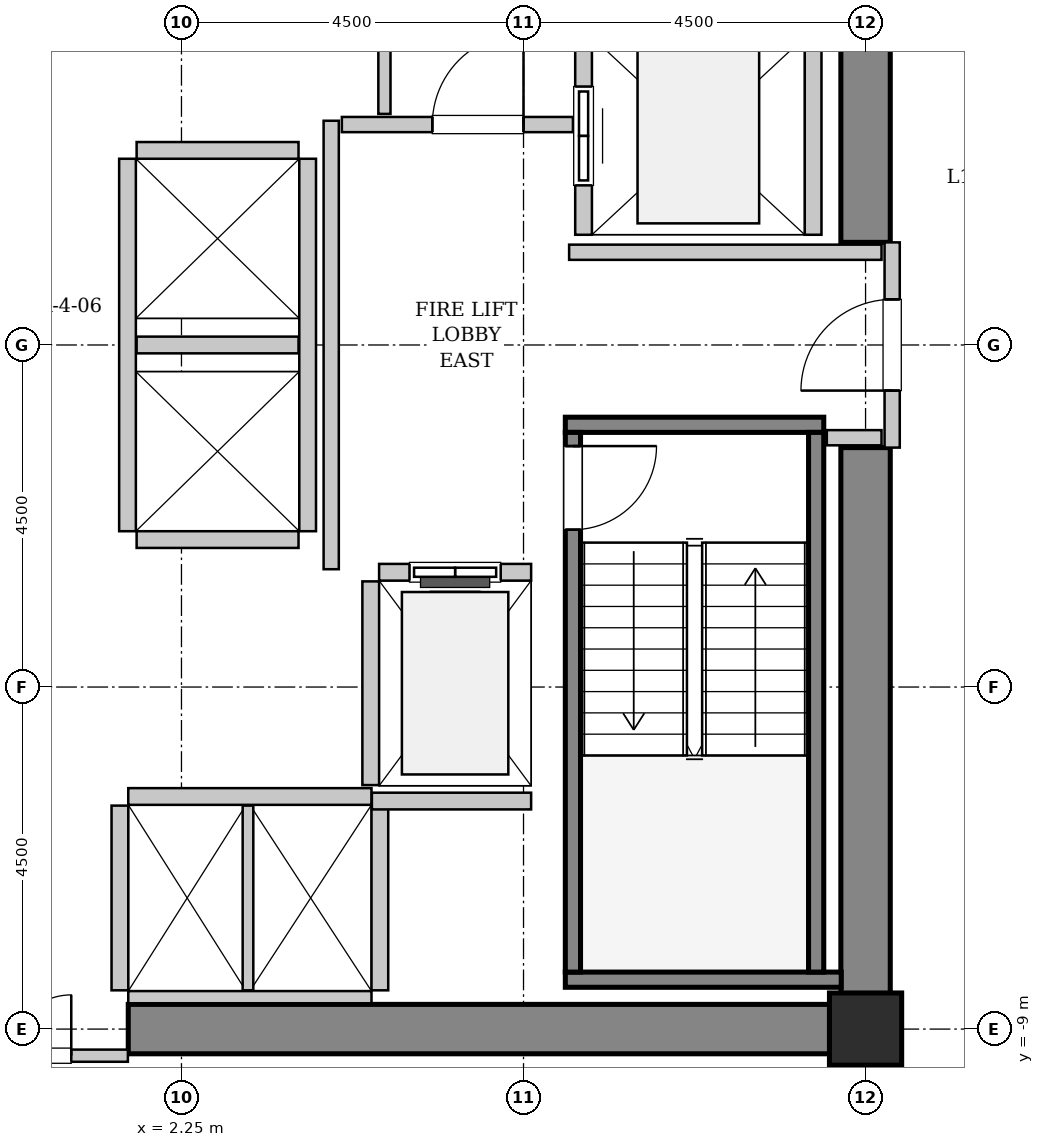
"""IFC4 building model, lengths in metres.
Left out: names, types, materials, properties, quantities, classifications, styles, units other than length and angle.
Written with IfcOpenShell. Run it as: python <this file> out.ifc"""

import sys

from ifc_helpers import new_model, si_unit, direction, frame, frame_2d, origin, origin_2d, place, context, subcontext, project, spatial, rectangle, hollow_rectangle, extrude, source, transform, mapped, element, fill, save


model = new_model("IFC4")
c1 = context("Model", 3, precision=1e-05, world=origin(), true_north=direction((0.0, 1.0)))
c2 = subcontext(c1, "Body", "Model", "MODEL_VIEW")
j1 = project(units=[si_unit("LENGTHUNIT", "METRE"), si_unit("PLANEANGLEUNIT", "RADIAN")], contexts=[c1])
p1 = place(None, origin())
s1 = spatial("IfcSite", under=j1, at=p1, CompositionType="ELEMENT")
p2 = place(p1, origin())
s2 = spatial("IfcBuilding", under=s1, at=p2, CompositionType="ELEMENT")
p3 = place(p2, frame((0.0, 0.0, 78.6)))
s3 = spatial("IfcBuildingStorey", under=s2, at=p3, CompositionType="ELEMENT", Elevation=78.6)
m1 = source(origin(), c2, "Body", "SweptSolid", [
    extrude(rectangle(XDim=10.025, YDim=0.65, at=frame_2d((5.012, 0.0))), origin(), (0.0, 0.0, 1.0), 3.8),
])
p4 = place(p3, frame((1.55, -9.0, 0.0), z_axis=(0.0, 0.0, 1.0), x_axis=(1.0, 0.0, 0.0)))
e1 = element("IfcWall", 1, at=p4, inside=s3, PredefinedType="SHEAR", context=c2, shape_type="MappedRepresentation", body=[
    mapped(m1, transform((0.0, 0.0, 0.0), x_axis=(1.0, 0.0, 0.0), y_axis=(0.0, 1.0, 0.0), z_axis=(0.0, 0.0, 1.0), scale=1.0)),
])
m2 = source(origin(), c2, "Body", "SweptSolid", [
    extrude(rectangle(XDim=7.325, YDim=0.65, at=frame_2d((3.663, 0.0))), origin(), (0.0, 0.0, 1.0), 3.8),
])
for number, where, z_axis, x_axis in (
    (2, (11.25, -8.675, 0.0), (0.0, 0.0, 1.0), (0.0, 1.0, 0.0)),
    (3, (11.25, 1.35, 0.0), (0.0, 0.0, 1.0), (0.0, 1.0, 0.0)),
):
    element("IfcWall", number, at=place(p3, frame(where, z_axis=z_axis, x_axis=x_axis)), inside=s3, PredefinedType="SHEAR", context=c2, shape_type="MappedRepresentation", body=[
        mapped(m2, transform((0.0, 0.0, 0.0), x_axis=(1.0, 0.0, 0.0), y_axis=(0.0, 1.0, 0.0), z_axis=(0.0, 0.0, 1.0), scale=1.0)),
    ])
m3 = source(origin(), c2, "Body", "SweptSolid", [
    extrude(hollow_rectangle(XDim=0.95, YDim=0.95, WallThickness=0.045, InnerFilletRadius=0.045, OuterFilletRadius=0.09, at=origin_2d()), origin(), (0.0, 0.0, 1.0), 3.8),
])
p5 = place(p3, frame((11.25, -9.0, 0.0), z_axis=(0.0, 0.0, 1.0), x_axis=(1.0, 0.0, 0.0)))
e4 = element("IfcColumn", 4, at=p5, inside=s3, PredefinedType="COLUMN", context=c2, shape_type="MappedRepresentation", body=[
    mapped(m3, transform((0.0, 0.0, 0.0), x_axis=(1.0, 0.0, 0.0), y_axis=(0.0, 1.0, 0.0), z_axis=(0.0, 0.0, 1.0), scale=1.0)),
])
m4 = source(origin(), c2, "Body", "SweptSolid", [
    extrude(rectangle(XDim=3.4, YDim=0.2, at=frame_2d((1.7, 0.0))), origin(), (0.0, 0.0, 1.0), 3.8),
])
p6 = place(p3, frame((7.3, -1.05, 0.0), z_axis=(0.0, 0.0, 1.0), x_axis=(1.0, 0.0, 0.0)))
e5 = element("IfcWall", 5, at=p6, inside=s3, PredefinedType="SOLIDWALL", context=c2, shape_type="MappedRepresentation", body=[
    mapped(m4, transform((0.0, 0.0, 0.0), x_axis=(1.0, 0.0, 0.0), y_axis=(0.0, 1.0, 0.0), z_axis=(0.0, 0.0, 1.0), scale=1.0)),
])
m5 = source(origin(), c2, "Body", "SweptSolid", [
    extrude(rectangle(XDim=3.63, YDim=0.2, at=frame_2d((1.815, 0.0))), origin(), (0.0, 0.0, 1.0), 3.8),
])
p7 = place(p3, frame((7.3, -8.35, 0.0), z_axis=(0.0, 0.0, 1.0), x_axis=(1.0, 0.0, 0.0)))
e6 = element("IfcWall", 6, at=p7, inside=s3, PredefinedType="SOLIDWALL", context=c2, shape_type="MappedRepresentation", body=[
    mapped(m5, transform((0.0, 0.0, 0.0), x_axis=(1.0, 0.0, 0.0), y_axis=(0.0, 1.0, 0.0), z_axis=(0.0, 0.0, 1.0), scale=1.0)),
])
m6 = source(origin(), c2, "Body", "SweptSolid", [
    extrude(rectangle(XDim=7.1, YDim=0.2, at=frame_2d((3.55, 0.0))), origin(), (0.0, 0.0, 1.0), 3.8),
])
p8 = place(p3, frame((7.4, -1.15, 0.0), z_axis=(0.0, 0.0, 1.0), x_axis=(0.0, -1.0, 0.0)))
e7 = element("IfcWall", 7, at=p8, inside=s3, PredefinedType="SOLIDWALL", context=c2, shape_type="MappedRepresentation", body=[
    mapped(m6, transform((0.0, 0.0, 0.0), x_axis=(1.0, 0.0, 0.0), y_axis=(0.0, 1.0, 0.0), z_axis=(0.0, 0.0, 1.0), scale=1.0)),
])
p9 = place(p8, frame((0.18, 0.0, 0.0)))
e8 = element("IfcOpeningElement", 8, at=p9, cuts=e7, PredefinedType="OPENING", context=c2, shape_type="SweptSolid", body=[
    extrude(rectangle(XDim=1.1, YDim=2.15, at=frame_2d((0.55, 1.075))), frame((0.0, 0.11, 0.0), z_axis=(0.0, -1.0, 0.0), x_axis=(1.0, 0.0, 0.0)), (0.0, 0.0, 1.0), 0.22),
])
p10 = place(p3, frame((10.6, -1.15, 0.0), z_axis=(0.0, 0.0, 1.0), x_axis=(0.0, -1.0, 0.0)))
e9 = element("IfcWall", 9, at=p10, inside=s3, PredefinedType="SOLIDWALL", context=c2, shape_type="MappedRepresentation", body=[
    mapped(m6, transform((0.0, 0.0, 0.0), x_axis=(1.0, 0.0, 0.0), y_axis=(0.0, 1.0, 0.0), z_axis=(0.0, 0.0, 1.0), scale=1.0)),
])
m7 = source(origin(), c2, "Body", "SweptSolid", [
    extrude(rectangle(XDim=2.0, YDim=0.22, at=frame_2d((1.0, 0.0))), origin(), (0.0, 0.0, 1.0), 3.535),
])
p11 = place(p3, frame((6.85, -2.99, 0.0), z_axis=(0.0, 0.0, 1.0), x_axis=(-1.0, 0.0, 0.0)))
e10 = element("IfcWall", 10, at=p11, inside=s3, PredefinedType="SOLIDWALL", context=c2, shape_type="MappedRepresentation", body=[
    mapped(m7, transform((0.0, 0.0, 0.0), x_axis=(1.0, 0.0, 0.0), y_axis=(0.0, 1.0, 0.0), z_axis=(0.0, 0.0, 1.0), scale=1.0)),
])
p12 = place(p11, frame((0.4, 0.0, 0.0)))
e11 = element("IfcOpeningElement", 11, at=p12, cuts=e10, PredefinedType="OPENING", context=c2, shape_type="SweptSolid", body=[
    extrude(rectangle(XDim=1.2, YDim=2.2, at=frame_2d((0.6, 1.1))), frame((0.0, 0.12, 0.0), z_axis=(0.0, -1.0, 0.0), x_axis=(1.0, 0.0, 0.0)), (0.0, 0.0, 1.0), 0.24),
])
m8 = source(origin(), c2, "Body", "SweptSolid", [
    extrude(rectangle(XDim=2.68, YDim=0.22, at=frame_2d((1.34, 0.0))), origin(), (0.0, 0.0, 1.0), 3.535),
])
p13 = place(p3, frame((4.74, -3.11, 0.0), z_axis=(0.0, 0.0, 1.0), x_axis=(0.0, -1.0, 0.0)))
e12 = element("IfcWall", 12, at=p13, inside=s3, PredefinedType="SOLIDWALL", context=c2, shape_type="MappedRepresentation", body=[
    mapped(m8, transform((0.0, 0.0, 0.0), x_axis=(1.0, 0.0, 0.0), y_axis=(0.0, 1.0, 0.0), z_axis=(0.0, 0.0, 1.0), scale=1.0)),
])
m9 = source(origin(), c2, "Body", "SweptSolid", [
    extrude(rectangle(XDim=5.45, YDim=0.22, at=frame_2d((2.725, 0.0))), origin(), (0.0, 0.0, 1.0), 3.535),
])
p14 = place(p3, frame((7.54, 6.9, 0.0), z_axis=(0.0, 0.0, 1.0), x_axis=(0.0, -1.0, 0.0)))
e13 = element("IfcWall", 13, at=p14, inside=s3, PredefinedType="SOLIDWALL", context=c2, shape_type="MappedRepresentation", body=[
    mapped(m9, transform((0.0, 0.0, 0.0), x_axis=(1.0, 0.0, 0.0), y_axis=(0.0, 1.0, 0.0), z_axis=(0.0, 0.0, 1.0), scale=1.0)),
])
p15 = place(p14, frame((3.5, 0.0, 0.0)))
e14 = element("IfcOpeningElement", 14, at=p15, cuts=e13, PredefinedType="OPENING", context=c2, shape_type="SweptSolid", body=[
    extrude(rectangle(XDim=1.3, YDim=2.3, at=frame_2d((0.65, 1.15))), frame((0.0, 0.12, 0.0), z_axis=(0.0, -1.0, 0.0), x_axis=(1.0, 0.0, 0.0)), (0.0, 0.0, 1.0), 0.24),
])
p16 = place(p14, frame((0.65, 0.0, 0.0)))
e15 = element("IfcOpeningElement", 15, at=p16, cuts=e13, PredefinedType="OPENING", context=c2, shape_type="SweptSolid", body=[
    extrude(rectangle(XDim=1.3, YDim=2.3, at=frame_2d((0.65, 1.15))), frame((0.0, 0.12, 0.0), z_axis=(0.0, -1.0, 0.0), x_axis=(1.0, 0.0, 0.0)), (0.0, 0.0, 1.0), 0.24),
])
p17 = place(p3, frame((10.56, 1.45, 0.0), z_axis=(0.0, 0.0, 1.0), x_axis=(0.0, 1.0, 0.0)))
e16 = element("IfcWall", 16, at=p17, inside=s3, PredefinedType="SOLIDWALL", context=c2, shape_type="MappedRepresentation", body=[
    mapped(m9, transform((0.0, 0.0, 0.0), x_axis=(1.0, 0.0, 0.0), y_axis=(0.0, 1.0, 0.0), z_axis=(0.0, 0.0, 1.0), scale=1.0)),
])
m10 = source(origin(), c2, "Body", "SweptSolid", [
    extrude(rectangle(XDim=3.2, YDim=0.22, at=frame_2d((1.6, 0.0))), origin(), (0.0, 0.0, 1.0), 3.535),
])
p18 = place(p3, frame((4.75, -5.94, 0.0), z_axis=(0.0, 0.0, 1.0), x_axis=(-1.0, 0.0, 0.0)))
e17 = element("IfcWall", 17, at=p18, inside=s3, PredefinedType="SOLIDWALL", context=c2, shape_type="MappedRepresentation", body=[
    mapped(m10, transform((0.0, 0.0, 0.0), x_axis=(1.0, 0.0, 0.0), y_axis=(0.0, 1.0, 0.0), z_axis=(0.0, 0.0, 1.0), scale=1.0)),
])
m11 = source(origin(), c2, "Body", "SweptSolid", [
    extrude(rectangle(XDim=3.2, YDim=0.16, at=frame_2d((1.6, 0.0))), origin(), (0.0, 0.0, 1.0), 2.425),
])
p19 = place(p3, frame((1.55, -8.58, 0.0), z_axis=(0.0, 0.0, 1.0), x_axis=(1.0, 0.0, 0.0)))
e18 = element("IfcWall", 18, at=p19, inside=s3, PredefinedType="PARTITIONING", context=c2, shape_type="MappedRepresentation", body=[
    mapped(m11, transform((0.0, 0.0, 0.0), x_axis=(1.0, 0.0, 0.0), y_axis=(0.0, 1.0, 0.0), z_axis=(0.0, 0.0, 1.0), scale=1.0)),
])
m12 = source(origin(), c2, "Body", "SweptSolid", [
    extrude(rectangle(XDim=2.43, YDim=0.22, at=frame_2d((1.215, 0.0))), origin(), (0.0, 0.0, 1.0), 3.535),
])
p20 = place(p3, frame((1.44, -6.06, 0.0), z_axis=(0.0, 0.0, 1.0), x_axis=(0.0, -1.0, 0.0)))
e19 = element("IfcWall", 19, at=p20, inside=s3, PredefinedType="SOLIDWALL", context=c2, shape_type="MappedRepresentation", body=[
    mapped(m12, transform((0.0, 0.0, 0.0), x_axis=(1.0, 0.0, 0.0), y_axis=(0.0, 1.0, 0.0), z_axis=(0.0, 0.0, 1.0), scale=1.0)),
])
m13 = source(origin(), c2, "Body", "SweptSolid", [
    extrude(rectangle(XDim=2.43, YDim=0.14, at=frame_2d((1.215, 0.0))), origin(), (0.0, 0.0, 1.0), 3.535),
])
p21 = place(p3, frame((3.125, -8.49, 0.0), z_axis=(0.0, 0.0, 1.0), x_axis=(0.0, 1.0, 0.0)))
e20 = element("IfcWall", 20, at=p21, inside=s3, PredefinedType="PARTITIONING", context=c2, shape_type="MappedRepresentation", body=[
    mapped(m13, transform((0.0, 0.0, 0.0), x_axis=(1.0, 0.0, 0.0), y_axis=(0.0, 1.0, 0.0), z_axis=(0.0, 0.0, 1.0), scale=1.0)),
])
p22 = place(p3, frame((4.86, -8.49, 0.0), z_axis=(0.0, 0.0, 1.0), x_axis=(0.0, 1.0, 0.0)))
e21 = element("IfcWall", 21, at=p22, inside=s3, PredefinedType="SOLIDWALL", context=c2, shape_type="MappedRepresentation", body=[
    mapped(m12, transform((0.0, 0.0, 0.0), x_axis=(1.0, 0.0, 0.0), y_axis=(0.0, 1.0, 0.0), z_axis=(0.0, 0.0, 1.0), scale=1.0)),
])
m14 = source(origin(), c2, "Body", "SweptSolid", [
    extrude(rectangle(XDim=4.9, YDim=0.22, at=frame_2d((2.45, 0.0))), origin(), (0.0, 0.0, 1.0), 3.535),
])
for number, where, z_axis, x_axis in (
    (22, (1.54, 2.45, 0.0), (0.0, 0.0, 1.0), (0.0, -1.0, 0.0)),
    (23, (3.91, -2.45, 0.0), (0.0, 0.0, 1.0), (0.0, 1.0, 0.0)),
):
    element("IfcWall", number, at=place(p3, frame(where, z_axis=z_axis, x_axis=x_axis)), inside=s3, PredefinedType="SOLIDWALL", context=c2, shape_type="MappedRepresentation", body=[
        mapped(m14, transform((0.0, 0.0, 0.0), x_axis=(1.0, 0.0, 0.0), y_axis=(0.0, 1.0, 0.0), z_axis=(0.0, 0.0, 1.0), scale=1.0)),
    ])
m15 = source(origin(), c2, "Body", "SweptSolid", [
    extrude(rectangle(XDim=2.13, YDim=0.22, at=frame_2d((1.065, 0.0))), origin(), (0.0, 0.0, 1.0), 3.535),
])
for number, where, z_axis, x_axis in (
    (24, (1.66, -2.56, 0.0), (0.0, 0.0, 1.0), (1.0, 0.0, 0.0)),
    (25, (1.66, 0.0, 0.0), (0.0, 0.0, 1.0), (1.0, 0.0, 0.0)),
    (26, (3.79, 2.56, 0.0), (0.0, 0.0, 1.0), (-1.0, 0.0, 0.0)),
):
    element("IfcWall", number, at=place(p3, frame(where, z_axis=z_axis, x_axis=x_axis)), inside=s3, PredefinedType="SOLIDWALL", context=c2, shape_type="MappedRepresentation", body=[
        mapped(m15, transform((0.0, 0.0, 0.0), x_axis=(1.0, 0.0, 0.0), y_axis=(0.0, 1.0, 0.0), z_axis=(0.0, 0.0, 1.0), scale=1.0)),
    ])
m16 = source(origin(), c2, "Body", "SweptSolid", [
    extrude(rectangle(XDim=2.095, YDim=0.22, at=frame_2d((1.048, 0.0))), origin(), (0.0, 0.0, 1.0), 3.535),
])
p23 = place(p3, frame((4.755, -6.0, 0.0), z_axis=(0.0, 0.0, 1.0), x_axis=(1.0, 0.0, 0.0)))
e27 = element("IfcWall", 27, at=p23, inside=s3, PredefinedType="SOLIDWALL", context=c2, shape_type="MappedRepresentation", body=[
    mapped(m16, transform((0.0, 0.0, 0.0), x_axis=(1.0, 0.0, 0.0), y_axis=(0.0, 1.0, 0.0), z_axis=(0.0, 0.0, 1.0), scale=1.0)),
])
m17 = source(origin(), c2, "Body", "SweptSolid", [
    extrude(rectangle(XDim=2.7, YDim=0.2, at=frame_2d((1.35, 0.0))), origin(), (0.0, 0.0, 1.0), 2.425),
])
p24 = place(p3, frame((11.6, -1.35, 0.0), z_axis=(0.0, 0.0, 1.0), x_axis=(0.0, 1.0, 0.0)))
e28 = element("IfcWall", 28, at=p24, inside=s3, PredefinedType="PARTITIONING", context=c2, shape_type="MappedRepresentation", body=[
    mapped(m17, transform((0.0, 0.0, 0.0), x_axis=(1.0, 0.0, 0.0), y_axis=(0.0, 1.0, 0.0), z_axis=(0.0, 0.0, 1.0), scale=1.0)),
])
p25 = place(p24, frame((0.75, 0.0, 0.0)))
e29 = element("IfcOpeningElement", 29, at=p25, cuts=e28, PredefinedType="OPENING", context=c2, shape_type="SweptSolid", body=[
    extrude(rectangle(XDim=1.2, YDim=2.15, at=frame_2d((0.6, 1.075))), frame((0.0, 0.11, 0.0), z_axis=(0.0, -1.0, 0.0), x_axis=(1.0, 0.0, 0.0)), (0.0, 0.0, 1.0), 0.22),
])
m18 = source(origin(), c2, "Body", "SweptSolid", [
    extrude(rectangle(XDim=5.9, YDim=0.2, at=frame_2d((2.95, 0.0))), origin(), (0.0, 0.0, 1.0), 3.535),
])
p26 = place(p3, frame((4.22, -2.95, 0.0), z_axis=(0.0, 0.0, 1.0), x_axis=(0.0, 1.0, 0.0)))
e30 = element("IfcWall", 30, at=p26, inside=s3, PredefinedType="PARTITIONING", context=c2, shape_type="MappedRepresentation", body=[
    mapped(m18, transform((0.0, 0.0, 0.0), x_axis=(1.0, 0.0, 0.0), y_axis=(0.0, 1.0, 0.0), z_axis=(0.0, 0.0, 1.0), scale=1.0)),
])
m19 = source(origin(), c2, "Body", "SweptSolid", [
    extrude(rectangle(XDim=3.04, YDim=0.2, at=frame_2d((1.52, 0.0))), origin(), (0.0, 0.0, 1.0), 3.535),
])
p27 = place(p3, frame((4.36, 2.9, 0.0), z_axis=(0.0, 0.0, 1.0), x_axis=(1.0, 0.0, 0.0)))
e31 = element("IfcWall", 31, at=p27, inside=s3, PredefinedType="PARTITIONING", context=c2, shape_type="MappedRepresentation", body=[
    mapped(m19, transform((0.0, 0.0, 0.0), x_axis=(1.0, 0.0, 0.0), y_axis=(0.0, 1.0, 0.0), z_axis=(0.0, 0.0, 1.0), scale=1.0)),
])
p28 = place(p27, frame((1.19, 0.0, 0.0)))
e32 = element("IfcOpeningElement", 32, at=p28, cuts=e31, PredefinedType="OPENING", context=c2, shape_type="SweptSolid", body=[
    extrude(rectangle(XDim=1.2, YDim=2.15, at=frame_2d((0.6, 1.075))), frame((0.0, 0.11, 0.0), z_axis=(0.0, -1.0, 0.0), x_axis=(1.0, 0.0, 0.0)), (0.0, 0.0, 1.0), 0.22),
])
m20 = source(origin(), c2, "Body", "SweptSolid", [
    extrude(rectangle(XDim=4.11, YDim=0.2, at=frame_2d((2.055, 0.0))), origin(), (0.0, 0.0, 1.0), 3.535),
])
p29 = place(p3, frame((7.35, 1.22, 0.0), z_axis=(0.0, 0.0, 1.0), x_axis=(1.0, 0.0, 0.0)))
e33 = element("IfcWall", 33, at=p29, inside=s3, PredefinedType="PARTITIONING", context=c2, shape_type="MappedRepresentation", body=[
    mapped(m20, transform((0.0, 0.0, 0.0), x_axis=(1.0, 0.0, 0.0), y_axis=(0.0, 1.0, 0.0), z_axis=(0.0, 0.0, 1.0), scale=1.0)),
])
m21 = source(origin(), c2, "Body", "SweptSolid", [
    extrude(rectangle(XDim=0.72, YDim=0.2, at=frame_2d((0.36, 0.0))), origin(), (0.0, 0.0, 1.0), 3.535),
])
p30 = place(p3, frame((10.74, -1.22, 0.0), z_axis=(0.0, 0.0, 1.0), x_axis=(1.0, 0.0, 0.0)))
e34 = element("IfcWall", 34, at=p30, inside=s3, PredefinedType="PARTITIONING", context=c2, shape_type="MappedRepresentation", body=[
    mapped(m21, transform((0.0, 0.0, 0.0), x_axis=(1.0, 0.0, 0.0), y_axis=(0.0, 1.0, 0.0), z_axis=(0.0, 0.0, 1.0), scale=1.0)),
])
m22 = source(origin(), c2, "Body", "SweptSolid", [
    extrude(rectangle(XDim=3.09, YDim=0.16, at=frame_2d((1.545, 0.0))), origin(), (0.0, 0.0, 1.0), 2.425),
])
p31 = place(p3, frame((-1.545, -9.35, 0.0), z_axis=(0.0, 0.0, 1.0), x_axis=(1.0, 0.0, 0.0)))
e35 = element("IfcWall", 35, at=p31, inside=s3, PredefinedType="PARTITIONING", context=c2, shape_type="MappedRepresentation", body=[
    mapped(m22, transform((0.0, 0.0, 0.0), x_axis=(1.0, 0.0, 0.0), y_axis=(0.0, 1.0, 0.0), z_axis=(0.0, 0.0, 1.0), scale=1.0)),
])
p32 = place(p31, frame((0.745, 0.0, 0.0)))
e36 = element("IfcOpeningElement", 36, at=p32, cuts=e35, PredefinedType="OPENING", context=c2, shape_type="SweptSolid", body=[
    extrude(rectangle(XDim=1.6, YDim=2.3, at=frame_2d((0.8, 1.15))), frame((0.0, 0.09, 0.0), z_axis=(0.0, -1.0, 0.0), x_axis=(1.0, 0.0, 0.0)), (0.0, 0.0, 1.0), 0.18),
])
m23 = source(origin(), c2, "Body", "SweptSolid", [
    extrude(rectangle(XDim=3.015, YDim=0.16, at=frame_2d((1.507, 0.0))), origin(), (0.0, 0.0, 1.0), 3.535),
])
p33 = place(p3, frame((4.92, 3.04, 0.0), z_axis=(0.0, 0.0, 1.0), x_axis=(0.0, 1.0, 0.0)))
e37 = element("IfcWall", 37, at=p33, inside=s3, PredefinedType="PARTITIONING", context=c2, shape_type="MappedRepresentation", body=[
    mapped(m23, transform((0.0, 0.0, 0.0), x_axis=(1.0, 0.0, 0.0), y_axis=(0.0, 1.0, 0.0), z_axis=(0.0, 0.0, 1.0), scale=1.0)),
])
m24 = source(origin(), c2, "Body", "SweptSolid", [
    extrude(rectangle(XDim=1.1, YDim=2.15, at=frame_2d((0.55, 1.075))), frame((0.0, 0.025, 0.0), z_axis=(0.0, -1.0, 0.0), x_axis=(1.0, 0.0, 0.0)), (0.0, 0.0, 1.0), 0.05),
])
p34 = place(p9, origin())
e38 = element("IfcDoor", 38, at=p34, inside=s3, OperationType="SINGLE_SWING_LEFT", PredefinedType="DOOR", context=c2, shape_type="MappedRepresentation", body=[
    mapped(m24, transform((0.0, 0.0, 0.0), x_axis=(1.0, 0.0, 0.0), y_axis=(0.0, 1.0, 0.0), z_axis=(0.0, 0.0, 1.0), scale=1.0)),
])
fill(e8, e38)
m25 = source(origin(), c2, "Body", "SweptSolid", [
    extrude(rectangle(XDim=1.2, YDim=2.2, at=frame_2d((0.6, 1.1))), frame((0.0, 0.025, 0.0), z_axis=(0.0, -1.0, 0.0), x_axis=(1.0, 0.0, 0.0)), (0.0, 0.0, 1.0), 0.05),
])
p35 = place(p12, origin())
e39 = element("IfcDoor", 39, at=p35, inside=s3, OperationType="SLIDING_TO_LEFT", PredefinedType="DOOR", context=c2, shape_type="MappedRepresentation", body=[
    mapped(m25, transform((0.0, 0.0, 0.0), x_axis=(1.0, 0.0, 0.0), y_axis=(0.0, 1.0, 0.0), z_axis=(0.0, 0.0, 1.0), scale=1.0)),
])
fill(e11, e39)
m26 = source(origin(), c2, "Body", "SweptSolid", [
    extrude(rectangle(XDim=1.3, YDim=2.3, at=frame_2d((0.65, 1.15))), frame((0.0, 0.025, 0.0), z_axis=(0.0, -1.0, 0.0), x_axis=(1.0, 0.0, 0.0)), (0.0, 0.0, 1.0), 0.05),
])
p36 = place(p15, origin())
e40 = element("IfcDoor", 40, at=p36, inside=s3, OperationType="SLIDING_TO_RIGHT", PredefinedType="DOOR", context=c2, shape_type="MappedRepresentation", body=[
    mapped(m26, transform((0.0, 0.0, 0.0), x_axis=(1.0, 0.0, 0.0), y_axis=(0.0, 1.0, 0.0), z_axis=(0.0, 0.0, 1.0), scale=1.0)),
])
fill(e14, e40)
m27 = source(origin(), c2, "Body", "SweptSolid", [
    extrude(rectangle(XDim=1.2, YDim=2.15, at=frame_2d((0.6, 1.075))), frame((0.0, 0.025, 0.0), z_axis=(0.0, -1.0, 0.0), x_axis=(1.0, 0.0, 0.0)), (0.0, 0.0, 1.0), 0.05),
])
p37 = place(p25, origin())
e41 = element("IfcDoor", 41, at=p37, inside=s3, OperationType="SINGLE_SWING_LEFT", PredefinedType="DOOR", context=c2, shape_type="MappedRepresentation", body=[
    mapped(m27, transform((0.0, 0.0, 0.0), x_axis=(1.0, 0.0, 0.0), y_axis=(0.0, 1.0, 0.0), z_axis=(0.0, 0.0, 1.0), scale=1.0)),
])
fill(e29, e41)
p38 = place(p28, origin())
e42 = element("IfcDoor", 42, at=p38, inside=s3, OperationType="SINGLE_SWING_RIGHT", PredefinedType="DOOR", context=c2, shape_type="MappedRepresentation", body=[
    mapped(m27, transform((0.0, 0.0, 0.0), x_axis=(1.0, 0.0, 0.0), y_axis=(0.0, 1.0, 0.0), z_axis=(0.0, 0.0, 1.0), scale=1.0)),
])
fill(e32, e42)
m28 = source(origin(), c2, "Body", "SweptSolid", [
    extrude(rectangle(XDim=1.6, YDim=2.3, at=frame_2d((0.8, 1.15))), frame((0.0, 0.025, 0.0), z_axis=(0.0, -1.0, 0.0), x_axis=(1.0, 0.0, 0.0)), (0.0, 0.0, 1.0), 0.05),
])
p39 = place(p32, origin())
e43 = element("IfcDoor", 43, at=p39, inside=s3, OperationType="DOUBLE_DOOR_SINGLE_SWING", PredefinedType="DOOR", context=c2, shape_type="MappedRepresentation", body=[
    mapped(m28, transform((0.0, 0.0, 0.0), x_axis=(1.0, 0.0, 0.0), y_axis=(0.0, 1.0, 0.0), z_axis=(0.0, 0.0, 1.0), scale=1.0)),
])
fill(e36, e43)
save(model, sys.argv[1])
